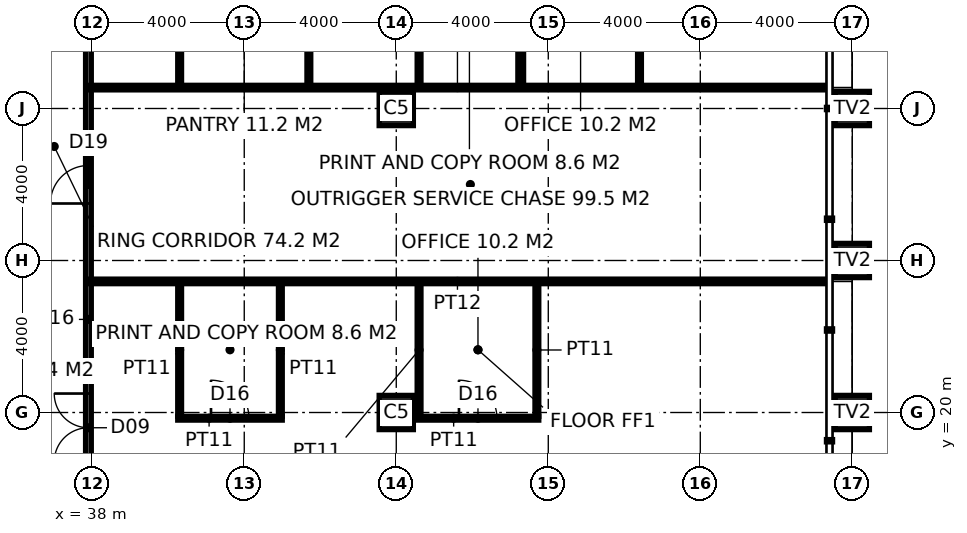
"""IFC4 building model, lengths in metres.
Left out: names, types, materials, properties, quantities, classifications, styles, units other than length and angle.
Written with IfcOpenShell. Run it as: python <this file> out.ifc"""

import sys

from ifc_helpers import new_model, si_unit, direction, frame, frame_2d, origin, origin_2d, place, context, subcontext, project, spatial, rectangle, hollow_rectangle, extrude, element, fill, save


model = new_model("IFC4")
c1 = context("Model", 3, precision=1e-05, world=origin(), true_north=direction((0.0, 1.0)))
c2 = subcontext(c1, "Body", "Model", "MODEL_VIEW")
j1 = project(units=[si_unit("LENGTHUNIT", "METRE"), si_unit("PLANEANGLEUNIT", "RADIAN")], contexts=[c1])
p1 = place(None, origin())
s1 = spatial("IfcSite", under=j1, at=p1, CompositionType="ELEMENT")
p2 = place(p1, origin())
s2 = spatial("IfcBuilding", under=s1, at=p2, CompositionType="ELEMENT")
p3 = place(p2, frame((0.0, 0.0, 105.4)))
s3 = spatial("IfcBuildingStorey", under=s2, at=p3, CompositionType="ELEMENT", Elevation=105.4)
for number, where, z_axis, x_axis in (
    (1, (58.0, 20.0, 0.0), (0.0, 0.0, 1.0), (1.0, 0.0, 0.0)),
    (2, (58.0, 24.0, 0.0), (0.0, 0.0, 1.0), (1.0, 0.0, 0.0)),
    (3, (58.0, 28.0, 0.0), (0.0, 0.0, 1.0), (1.0, 0.0, 0.0)),
):
    element("IfcColumn", number, at=place(p3, frame(where, z_axis=z_axis, x_axis=x_axis)), inside=s3, PredefinedType="USERDEFINED", context=c2, shape_type="SweptSolid", body=[
        extrude(hollow_rectangle(XDim=0.9, YDim=0.9, WallThickness=0.1, at=origin_2d()), origin(), (0.0, 0.0, 1.0), 4.0),
    ])
for number, where, z_axis, x_axis in (
    (4, (46.0, 20.0, 0.0), (0.0, 0.0, 1.0), (1.0, 0.0, 0.0)),
    (5, (46.0, 28.0, 0.0), (0.0, 0.0, 1.0), (1.0, 0.0, 0.0)),
):
    element("IfcColumn", number, at=place(p3, frame(where, z_axis=z_axis, x_axis=x_axis)), inside=s3, PredefinedType="COLUMN", context=c2, shape_type="SweptSolid", body=[
        extrude(hollow_rectangle(XDim=0.9, YDim=0.9, WallThickness=0.1, at=origin_2d()), origin(), (0.0, 0.0, 1.0), 4.0),
    ])
p4 = place(p3, frame((37.9, 15.625, 0.0), z_axis=(0.0, 0.0, 1.0), x_axis=(0.0, 1.0, 0.0)))
e6 = element("IfcWall", 6, at=p4, inside=s3, PredefinedType="PARTITIONING", context=c2, shape_type="SweptSolid", body=[
    extrude(rectangle(XDim=22.75, YDim=0.15, at=frame_2d((11.375, 0.0))), origin(), (0.0, 0.0, 1.0), 2.65),
])
p5 = place(p4, frame((3.074, 0.0, 0.0)))
e7 = element("IfcOpeningElement", 7, at=p5, cuts=e6, PredefinedType="OPENING", context=c2, shape_type="SweptSolid", body=[
    extrude(rectangle(XDim=1.8, YDim=2.4, at=frame_2d((0.9, 1.2))), frame((0.0, 0.085, 0.0), z_axis=(0.0, -1.0, 0.0), x_axis=(1.0, 0.0, 0.0)), (0.0, 0.0, 1.0), 0.17),
])
p6 = place(p4, frame((16.876, 0.0, 0.0)))
e8 = element("IfcOpeningElement", 8, at=p6, cuts=e6, PredefinedType="OPENING", context=c2, shape_type="SweptSolid", body=[
    extrude(rectangle(XDim=1.8, YDim=2.4, at=frame_2d((0.9, 1.2))), frame((0.0, 0.085, 0.0), z_axis=(0.0, -1.0, 0.0), x_axis=(1.0, 0.0, 0.0)), (0.0, 0.0, 1.0), 0.17),
])
p7 = place(p4, frame((9.875, 0.0, 0.0)))
e9 = element("IfcOpeningElement", 9, at=p7, cuts=e6, PredefinedType="OPENING", context=c2, shape_type="SweptSolid", body=[
    extrude(rectangle(XDim=1.0, YDim=2.2, at=frame_2d((0.5, 1.1))), frame((0.0, 0.085, 0.0), z_axis=(0.0, -1.0, 0.0), x_axis=(1.0, 0.0, 0.0)), (0.0, 0.0, 1.0), 0.17),
])
for number, where, z_axis, x_axis in (
    (10, (37.9, 23.45, 0.0), (0.0, 0.0, 1.0), (1.0, 0.0, 0.0)),
    (11, (37.9, 28.55, 0.0), (0.0, 0.0, 1.0), (1.0, 0.0, 0.0)),
):
    element("IfcWall", number, at=place(p3, frame(where, z_axis=z_axis, x_axis=x_axis)), inside=s3, PredefinedType="PARTITIONING", context=c2, shape_type="SweptSolid", body=[
        extrude(rectangle(XDim=19.42, YDim=0.12, at=frame_2d((9.71, 0.0))), origin(), (0.0, 0.0, 1.0), 2.65),
    ])
p8 = place(p3, frame((40.25, 19.85, 0.0), z_axis=(0.0, 0.0, 1.0), x_axis=(1.0, 0.0, 0.0)))
e12 = element("IfcWall", 12, at=p8, inside=s3, PredefinedType="PARTITIONING", context=c2, shape_type="SweptSolid", body=[
    extrude(rectangle(XDim=2.75, YDim=0.1, at=frame_2d((1.375, 0.0))), origin(), (0.0, 0.0, 1.0), 2.85),
])
p9 = place(p8, frame((0.875, 0.0, 0.0)))
e13 = element("IfcOpeningElement", 13, at=p9, cuts=e12, PredefinedType="OPENING", context=c2, shape_type="SweptSolid", body=[
    extrude(rectangle(XDim=1.0, YDim=2.2, at=frame_2d((0.5, 1.1))), frame((0.0, 0.06, 0.0), z_axis=(0.0, -1.0, 0.0), x_axis=(1.0, 0.0, 0.0)), (0.0, 0.0, 1.0), 0.12),
])
p10 = place(p3, frame((46.55, 19.85, 0.0), z_axis=(0.0, 0.0, 1.0), x_axis=(1.0, 0.0, 0.0)))
e14 = element("IfcWall", 14, at=p10, inside=s3, PredefinedType="PARTITIONING", context=c2, shape_type="SweptSolid", body=[
    extrude(rectangle(XDim=3.2, YDim=0.1, at=frame_2d((1.6, 0.0))), origin(), (0.0, 0.0, 1.0), 2.85),
])
p11 = place(p10, frame((1.1, 0.0, 0.0)))
e15 = element("IfcOpeningElement", 15, at=p11, cuts=e14, PredefinedType="OPENING", context=c2, shape_type="SweptSolid", body=[
    extrude(rectangle(XDim=1.0, YDim=2.2, at=frame_2d((0.5, 1.1))), frame((0.0, 0.06, 0.0), z_axis=(0.0, -1.0, 0.0), x_axis=(1.0, 0.0, 0.0)), (0.0, 0.0, 1.0), 0.12),
])
for number, where, z_axis, x_axis in (
    (16, (40.3, 19.9, 0.0), (0.0, 0.0, 1.0), (0.0, 1.0, 0.0)),
    (17, (40.3, 28.61, 0.0), (0.0, 0.0, 1.0), (0.0, 1.0, 0.0)),
    (18, (42.95, 19.9, 0.0), (0.0, 0.0, 1.0), (0.0, 1.0, 0.0)),
    (19, (43.7, 28.61, 0.0), (0.0, 0.0, 1.0), (0.0, 1.0, 0.0)),
    (20, (46.6, 19.9, 0.0), (0.0, 0.0, 1.0), (0.0, 1.0, 0.0)),
    (21, (46.6, 28.61, 0.0), (0.0, 0.0, 1.0), (0.0, 1.0, 0.0)),
    (22, (49.25, 28.61, 0.0), (0.0, 0.0, 1.0), (0.0, 1.0, 0.0)),
    (23, (49.3, 28.61, 0.0), (0.0, 0.0, 1.0), (0.0, 1.0, 0.0)),
    (24, (49.7, 19.9, 0.0), (0.0, 0.0, 1.0), (0.0, 1.0, 0.0)),
    (25, (52.4, 28.61, 0.0), (0.0, 0.0, 1.0), (0.0, 1.0, 0.0)),
):
    element("IfcWall", number, at=place(p3, frame(where, z_axis=z_axis, x_axis=x_axis)), inside=s3, PredefinedType="PARTITIONING", context=c2, shape_type="SweptSolid", body=[
        extrude(rectangle(XDim=3.49, YDim=0.1, at=frame_2d((1.745, 0.0))), origin(), (0.0, 0.0, 1.0), 3.85),
    ])
p12 = place(p5, origin())
e26 = element("IfcDoor", 26, at=p12, inside=s3, OperationType="DOUBLE_DOOR_DOUBLE_SWING", PredefinedType="DOOR", context=c2, shape_type="SweptSolid", body=[
    extrude(rectangle(XDim=1.8, YDim=2.4, at=frame_2d((0.9, 1.2))), frame((0.0, 0.025, 0.0), z_axis=(0.0, -1.0, 0.0), x_axis=(1.0, 0.0, 0.0)), (0.0, 0.0, 1.0), 0.05),
])
fill(e7, e26)
p13 = place(p7, origin())
e27 = element("IfcDoor", 27, at=p13, inside=s3, OperationType="SINGLE_SWING_LEFT", PredefinedType="DOOR", context=c2, shape_type="SweptSolid", body=[
    extrude(rectangle(XDim=1.0, YDim=2.2, at=frame_2d((0.5, 1.1))), frame((0.0, 0.025, 0.0), z_axis=(0.0, -1.0, 0.0), x_axis=(1.0, 0.0, 0.0)), (0.0, 0.0, 1.0), 0.05),
])
fill(e9, e27)
p14 = place(p9, origin())
e28 = element("IfcDoor", 28, at=p14, inside=s3, OperationType="SINGLE_SWING_LEFT", PredefinedType="DOOR", context=c2, shape_type="SweptSolid", body=[
    extrude(rectangle(XDim=1.0, YDim=2.2, at=frame_2d((0.5, 1.1))), frame((0.0, 0.025, 0.0), z_axis=(0.0, -1.0, 0.0), x_axis=(1.0, 0.0, 0.0)), (0.0, 0.0, 1.0), 0.05),
])
fill(e13, e28)
p15 = place(p11, origin())
e29 = element("IfcDoor", 29, at=p15, inside=s3, OperationType="SINGLE_SWING_LEFT", PredefinedType="DOOR", context=c2, shape_type="SweptSolid", body=[
    extrude(rectangle(XDim=1.0, YDim=2.2, at=frame_2d((0.5, 1.1))), frame((0.0, 0.025, 0.0), z_axis=(0.0, -1.0, 0.0), x_axis=(1.0, 0.0, 0.0)), (0.0, 0.0, 1.0), 0.05),
])
fill(e15, e29)
save(model, sys.argv[1])
